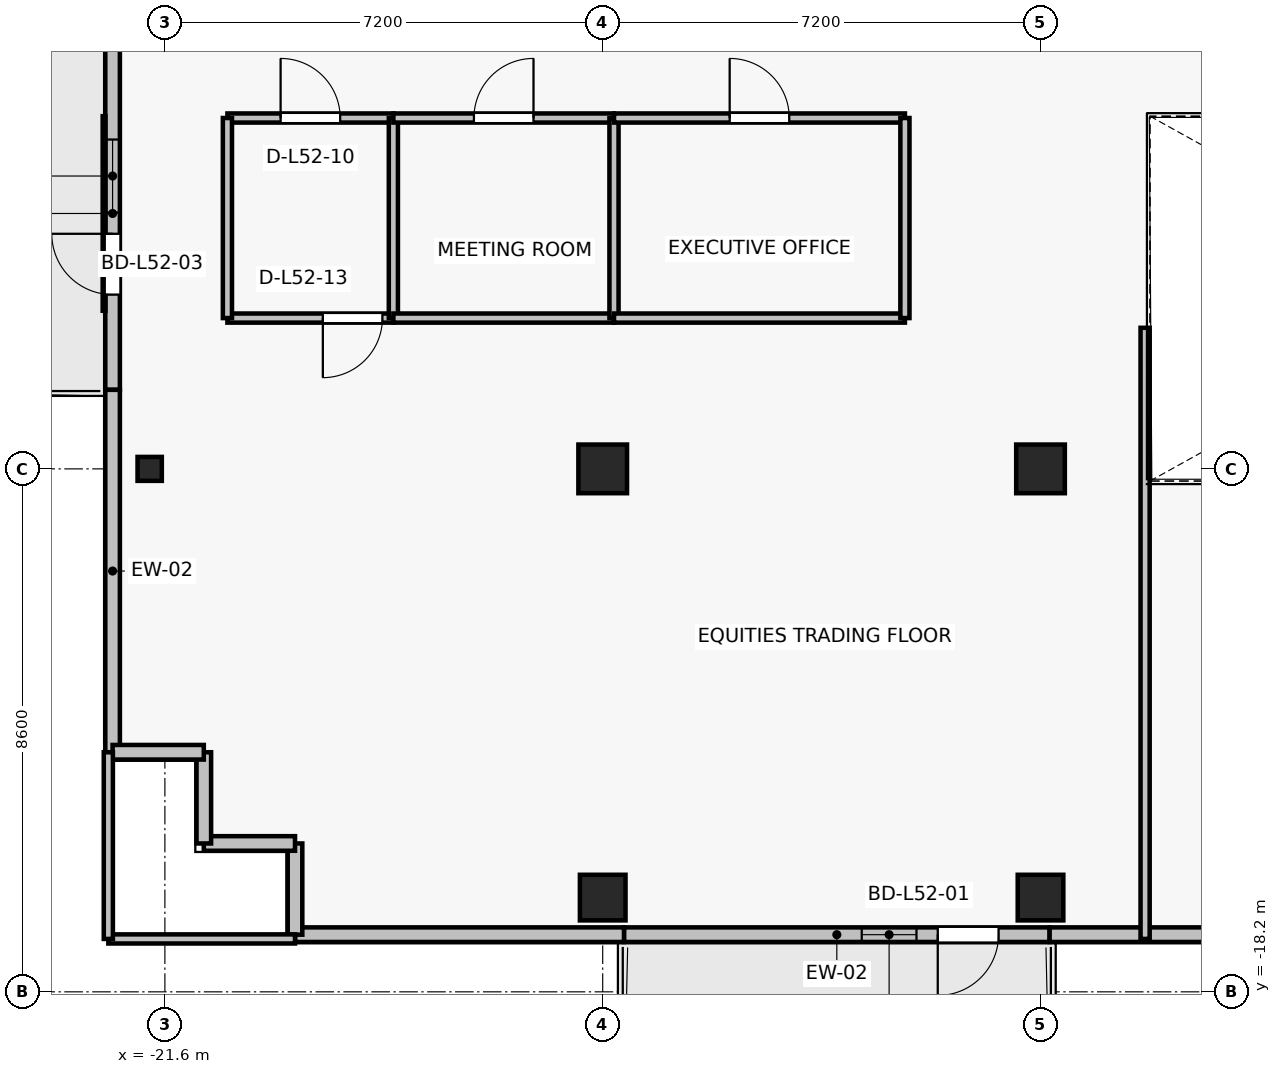
"""IFC4 building model, lengths in metres.
Left out: names, types, materials, properties, quantities, classifications, styles, units other than length and angle.
Written with IfcOpenShell. Run it as: python <this file> out.ifc"""

import sys

from ifc_helpers import new_model, si_unit, direction, frame, frame_2d, origin, origin_2d, place, context, subcontext, project, spatial, rectangle, i_section, extrude, source, transform, mapped, element, fill, save


model = new_model("IFC4")
c1 = context("Model", 3, precision=1e-05, world=origin(), true_north=direction((0.0, 1.0)))
c2 = subcontext(c1, "Body", "Model", "MODEL_VIEW")
j1 = project(units=[si_unit("LENGTHUNIT", "METRE"), si_unit("PLANEANGLEUNIT", "RADIAN")], contexts=[c1])
p1 = place(None, origin())
s1 = spatial("IfcSite", under=j1, at=p1, CompositionType="ELEMENT")
p2 = place(p1, origin())
s2 = spatial("IfcBuilding", under=s1, at=p2, CompositionType="ELEMENT")
p3 = place(p2, frame((0.0, 0.0, 185.8)))
s3 = spatial("IfcBuildingStorey", under=s2, at=p3, CompositionType="ELEMENT", Elevation=185.8)
for number, where, z_axis, x_axis in (
    (1, (-14.4, -9.6, 0.0), (0.0, 0.0, 1.0), (1.0, 0.0, 0.0)),
    (2, (-7.2, -9.6, 0.0), (0.0, 0.0, 1.0), (1.0, 0.0, 0.0)),
):
    element("IfcColumn", number, at=place(p3, frame(where, z_axis=z_axis, x_axis=x_axis)), inside=s3, PredefinedType="COLUMN", context=c2, shape_type="SweptSolid", body=[
        extrude(rectangle(XDim=0.8, YDim=0.8, at=origin_2d()), origin(), (0.0, 0.0, 1.0), 3.3),
    ])
for number, where, z_axis, x_axis in (
    (3, (-14.4, -16.65, 0.0), (0.0, 0.0, 1.0), (1.0, 0.0, 0.0)),
    (4, (-7.2, -16.65, 0.0), (0.0, 0.0, 1.0), (1.0, 0.0, 0.0)),
):
    element("IfcColumn", number, at=place(p3, frame(where, z_axis=z_axis, x_axis=x_axis)), inside=s3, PredefinedType="COLUMN", context=c2, shape_type="SweptSolid", body=[
        extrude(rectangle(XDim=0.75, YDim=0.75, at=origin_2d()), origin(), (0.0, 0.0, 1.0), 3.3),
    ])
p4 = place(p3, frame((-21.85, -9.6, 0.0), z_axis=(0.0, 0.0, 1.0), x_axis=(1.0, 0.0, 0.0)))
e5 = element("IfcColumn", 5, at=p4, inside=s3, PredefinedType="COLUMN", context=c2, shape_type="SweptSolid", body=[
    extrude(i_section(OverallWidth=0.399, OverallDepth=0.394, WebThickness=0.023, FlangeThickness=0.037, FilletRadius=0.015, at=origin_2d()), origin(), (0.0, 0.0, 1.0), 3.3),
])
p5 = place(p3, frame((-7.05, -17.26, 0.0), z_axis=(0.0, 0.0, 1.0), x_axis=(-1.0, 0.0, 0.0)))
e6 = element("IfcWall", 6, at=p5, inside=s3, PredefinedType="SOLIDWALL", context=c2, shape_type="SweptSolid", body=[
    extrude(rectangle(XDim=7.0, YDim=0.24, at=frame_2d((3.5, 0.0))), origin(), (0.0, 0.0, 1.0), 2.665),
])
p6 = place(p5, frame((0.84, 0.0, 0.0)))
e7 = element("IfcOpeningElement", 7, at=p6, cuts=e6, PredefinedType="OPENING", context=c2, shape_type="SweptSolid", body=[
    extrude(rectangle(XDim=1.0, YDim=2.2, at=frame_2d((0.5, 1.1))), frame((0.0, 0.13, 0.0), z_axis=(0.0, -1.0, 0.0), x_axis=(1.0, 0.0, 0.0)), (0.0, 0.0, 1.0), 0.26),
])
p7 = place(p5, frame((2.19, 0.0, 0.85)))
e8 = element("IfcOpeningElement", 8, at=p7, cuts=e6, PredefinedType="OPENING", context=c2, shape_type="SweptSolid", body=[
    extrude(rectangle(XDim=0.9, YDim=1.35, at=frame_2d((0.45, 0.675))), frame((0.0, 0.13, 0.0), z_axis=(0.0, -1.0, 0.0), x_axis=(1.0, 0.0, 0.0)), (0.0, 0.0, 1.0), 0.26),
])
p8 = place(p3, frame((-22.46, -8.3, 0.0), z_axis=(0.0, 0.0, 1.0), x_axis=(0.0, 1.0, 0.0)))
e9 = element("IfcWall", 9, at=p8, inside=s3, PredefinedType="SOLIDWALL", context=c2, shape_type="SweptSolid", body=[
    extrude(rectangle(XDim=5.8, YDim=0.24, at=frame_2d((2.9, 0.0))), origin(), (0.0, 0.0, 1.0), 3.075),
])
p9 = place(p8, frame((1.566, 0.0, 0.0)))
e10 = element("IfcOpeningElement", 10, at=p9, cuts=e9, PredefinedType="OPENING", context=c2, shape_type="SweptSolid", body=[
    extrude(rectangle(XDim=1.0, YDim=2.2, at=frame_2d((0.5, 1.1))), frame((0.0, 0.13, 0.0), z_axis=(0.0, -1.0, 0.0), x_axis=(1.0, 0.0, 0.0)), (0.0, 0.0, 1.0), 0.26),
])
p10 = place(p8, frame((2.916, 0.0, 0.85)))
e11 = element("IfcOpeningElement", 11, at=p10, cuts=e9, PredefinedType="OPENING", context=c2, shape_type="SweptSolid", body=[
    extrude(rectangle(XDim=1.2, YDim=1.5, at=frame_2d((0.6, 0.75))), frame((0.0, 0.13, 0.0), z_axis=(0.0, -1.0, 0.0), x_axis=(1.0, 0.0, 0.0)), (0.0, 0.0, 1.0), 0.26),
])
p11 = place(p3, frame((-22.46, -8.3, 0.0), z_axis=(0.0, 0.0, 1.0), x_axis=(0.0, -1.0, 0.0)))
e12 = element("IfcWall", 12, at=p11, inside=s3, PredefinedType="SOLIDWALL", context=c2, shape_type="SweptSolid", body=[
    extrude(rectangle(XDim=5.96, YDim=0.24, at=frame_2d((2.98, 0.0))), origin(), (0.0, 0.0, 1.0), 3.075),
])
p12 = place(p3, frame((-7.05, -17.26, 0.0), z_axis=(0.0, 0.0, 1.0), x_axis=(1.0, 0.0, 0.0)))
e13 = element("IfcWall", 13, at=p12, inside=s3, PredefinedType="SOLIDWALL", context=c2, shape_type="SweptSolid", body=[
    extrude(rectangle(XDim=3.85, YDim=0.24, at=frame_2d((1.925, 0.0))), origin(), (0.0, 0.0, 1.0), 3.075),
])
p13 = place(p3, frame((-19.46, -17.26, 0.0), z_axis=(0.0, 0.0, 1.0), x_axis=(1.0, 0.0, 0.0)))
e14 = element("IfcWall", 14, at=p13, inside=s3, PredefinedType="SOLIDWALL", context=c2, shape_type="SweptSolid", body=[
    extrude(rectangle(XDim=5.41, YDim=0.24, at=frame_2d((2.705, 0.0))), origin(), (0.0, 0.0, 1.0), 3.075),
])
for number, where, z_axis, x_axis in (
    (15, (-19.46, -15.76, 0.0), (0.0, 0.0, 1.0), (0.0, -1.0, 0.0)),
    (16, (-20.96, -15.76, 0.0), (0.0, 0.0, 1.0), (1.0, 0.0, 0.0)),
    (17, (-20.96, -14.26, 0.0), (0.0, 0.0, 1.0), (0.0, -1.0, 0.0)),
    (18, (-22.46, -14.26, 0.0), (0.0, 0.0, 1.0), (1.0, 0.0, 0.0)),
):
    element("IfcWall", number, at=place(p3, frame(where, z_axis=z_axis, x_axis=x_axis)), inside=s3, PredefinedType="SOLIDWALL", context=c2, shape_type="SweptSolid", body=[
        extrude(rectangle(XDim=1.5, YDim=0.24, at=frame_2d((0.75, 0.0))), origin(), (0.0, 0.0, 1.0), 3.075),
    ])
p14 = place(p3, frame((-17.843, -7.12, 0.0), z_axis=(0.0, 0.0, 1.0), x_axis=(-1.0, 0.0, 0.0)))
e19 = element("IfcWall", 19, at=p14, inside=s3, PredefinedType="PARTITIONING", context=c2, shape_type="SweptSolid", body=[
    extrude(rectangle(XDim=2.729, YDim=0.15, at=frame_2d((1.365, 0.0))), origin(), (0.0, 0.0, 1.0), 3.075),
])
p15 = place(p14, frame((0.18, 0.0, 0.0)))
e20 = element("IfcOpeningElement", 20, at=p15, cuts=e19, PredefinedType="OPENING", context=c2, shape_type="SweptSolid", body=[
    extrude(rectangle(XDim=0.98, YDim=2.15, at=frame_2d((0.49, 1.075))), frame((0.0, 0.085, 0.0), z_axis=(0.0, -1.0, 0.0), x_axis=(1.0, 0.0, 0.0)), (0.0, 0.0, 1.0), 0.17),
])
p16 = place(p3, frame((-20.572, -3.83, 0.0), z_axis=(0.0, 0.0, 1.0), x_axis=(1.0, 0.0, 0.0)))
e21 = element("IfcWall", 21, at=p16, inside=s3, PredefinedType="PARTITIONING", context=c2, shape_type="SweptSolid", body=[
    extrude(rectangle(XDim=2.729, YDim=0.15, at=frame_2d((1.365, 0.0))), origin(), (0.0, 0.0, 1.0), 3.075),
])
p17 = place(p16, frame((0.875, 0.0, 0.0)))
e22 = element("IfcOpeningElement", 22, at=p17, cuts=e21, PredefinedType="OPENING", context=c2, shape_type="SweptSolid", body=[
    extrude(rectangle(XDim=0.98, YDim=2.15, at=frame_2d((0.49, 1.075))), frame((0.0, 0.085, 0.0), z_axis=(0.0, -1.0, 0.0), x_axis=(1.0, 0.0, 0.0)), (0.0, 0.0, 1.0), 0.17),
])
for number, where, z_axis, x_axis in (
    (23, (-20.572, -7.12, 0.0), (0.0, 0.0, 1.0), (0.0, 1.0, 0.0)),
    (24, (-17.843, -3.83, 0.0), (0.0, 0.0, 1.0), (0.0, -1.0, 0.0)),
):
    element("IfcWall", number, at=place(p3, frame(where, z_axis=z_axis, x_axis=x_axis)), inside=s3, PredefinedType="PARTITIONING", context=c2, shape_type="SweptSolid", body=[
        extrude(rectangle(XDim=3.29, YDim=0.15, at=frame_2d((1.645, 0.0))), origin(), (0.0, 0.0, 1.0), 2.665),
    ])
p18 = place(p3, frame((-14.214, -7.12, 0.0), z_axis=(0.0, 0.0, 1.0), x_axis=(-1.0, 0.0, 0.0)))
e25 = element("IfcWall", 25, at=p18, inside=s3, PredefinedType="PARTITIONING", context=c2, shape_type="SweptSolid", body=[
    extrude(rectangle(XDim=3.628, YDim=0.15, at=frame_2d((1.814, 0.0))), origin(), (0.0, 0.0, 1.0), 2.565),
])
p19 = place(p3, frame((-17.843, -3.83, 0.0), z_axis=(0.0, 0.0, 1.0), x_axis=(1.0, 0.0, 0.0)))
e26 = element("IfcWall", 26, at=p19, inside=s3, PredefinedType="PARTITIONING", context=c2, shape_type="SweptSolid", body=[
    extrude(rectangle(XDim=3.628, YDim=0.15, at=frame_2d((1.814, 0.0))), origin(), (0.0, 0.0, 1.0), 2.565),
])
p20 = place(p19, frame((1.324, 0.0, 0.0)))
e27 = element("IfcOpeningElement", 27, at=p20, cuts=e26, PredefinedType="OPENING", context=c2, shape_type="SweptSolid", body=[
    extrude(rectangle(XDim=0.98, YDim=2.15, at=frame_2d((0.49, 1.075))), frame((0.0, 0.085, 0.0), z_axis=(0.0, -1.0, 0.0), x_axis=(1.0, 0.0, 0.0)), (0.0, 0.0, 1.0), 0.17),
])
p21 = place(p3, frame((-14.214, -3.83, 0.0), z_axis=(0.0, 0.0, 1.0), x_axis=(0.0, -1.0, 0.0)))
e28 = element("IfcWall", 28, at=p21, inside=s3, PredefinedType="PARTITIONING", context=c2, shape_type="SweptSolid", body=[
    extrude(rectangle(XDim=3.29, YDim=0.15, at=frame_2d((1.645, 0.0))), origin(), (0.0, 0.0, 1.0), 2.565),
])
p22 = place(p3, frame((-9.43, -7.12, 0.0), z_axis=(0.0, 0.0, 1.0), x_axis=(-1.0, 0.0, 0.0)))
e29 = element("IfcWall", 29, at=p22, inside=s3, PredefinedType="PARTITIONING", context=c2, shape_type="SweptSolid", body=[
    extrude(rectangle(XDim=4.784, YDim=0.15, at=frame_2d((2.392, 0.0))), origin(), (0.0, 0.0, 1.0), 2.565),
])
p23 = place(p3, frame((-14.214, -3.83, 0.0), z_axis=(0.0, 0.0, 1.0), x_axis=(1.0, 0.0, 0.0)))
e30 = element("IfcWall", 30, at=p23, inside=s3, PredefinedType="PARTITIONING", context=c2, shape_type="SweptSolid", body=[
    extrude(rectangle(XDim=4.784, YDim=0.15, at=frame_2d((2.392, 0.0))), origin(), (0.0, 0.0, 1.0), 2.565),
])
p24 = place(p23, frame((1.902, 0.0, 0.0)))
e31 = element("IfcOpeningElement", 31, at=p24, cuts=e30, PredefinedType="OPENING", context=c2, shape_type="SweptSolid", body=[
    extrude(rectangle(XDim=0.98, YDim=2.15, at=frame_2d((0.49, 1.075))), frame((0.0, 0.085, 0.0), z_axis=(0.0, -1.0, 0.0), x_axis=(1.0, 0.0, 0.0)), (0.0, 0.0, 1.0), 0.17),
])
p25 = place(p3, frame((-9.43, -3.83, 0.0), z_axis=(0.0, 0.0, 1.0), x_axis=(0.0, -1.0, 0.0)))
e32 = element("IfcWall", 32, at=p25, inside=s3, PredefinedType="PARTITIONING", context=c2, shape_type="SweptSolid", body=[
    extrude(rectangle(XDim=3.29, YDim=0.15, at=frame_2d((1.645, 0.0))), origin(), (0.0, 0.0, 1.0), 2.665),
])
p26 = place(p3, frame((-19.46, -17.33, 0.0), z_axis=(0.0, 0.0, 1.0), x_axis=(-1.0, 0.0, 0.0)))
e33 = element("IfcWall", 33, at=p26, inside=s3, PredefinedType="PARTITIONING", context=c2, shape_type="SweptSolid", body=[
    extrude(rectangle(XDim=3.07, YDim=0.15, at=frame_2d((1.535, 0.0))), origin(), (0.0, 0.0, 1.0), 2.665),
])
p27 = place(p3, frame((-22.53, -17.33, 0.0), z_axis=(0.0, 0.0, 1.0), x_axis=(0.0, 1.0, 0.0)))
e34 = element("IfcWall", 34, at=p27, inside=s3, PredefinedType="PARTITIONING", context=c2, shape_type="SweptSolid", body=[
    extrude(rectangle(XDim=3.07, YDim=0.15, at=frame_2d((1.535, 0.0))), origin(), (0.0, 0.0, 1.0), 3.075),
])
p28 = place(p3, frame((-5.48, -7.28, 0.0), z_axis=(0.0, 0.0, 1.0), x_axis=(0.0, -1.0, 0.0)))
e35 = element("IfcWall", 35, at=p28, inside=s3, PredefinedType="PARTITIONING", context=c2, shape_type="SweptSolid", body=[
    extrude(rectangle(XDim=10.05, YDim=0.15, at=frame_2d((5.025, 0.0))), origin(), (0.0, 0.0, 1.0), 2.565),
])
m1 = source(origin(), c2, "Body", "SweptSolid", [
    extrude(rectangle(XDim=1.0, YDim=2.2, at=frame_2d((0.5, 1.1))), frame((0.0, 0.025, 0.0), z_axis=(0.0, -1.0, 0.0), x_axis=(1.0, 0.0, 0.0)), (0.0, 0.0, 1.0), 0.05),
])
p29 = place(p6, origin())
e36 = element("IfcDoor", 36, at=p29, inside=s3, OperationType="SINGLE_SWING_RIGHT", PredefinedType="DOOR", context=c2, shape_type="MappedRepresentation", body=[
    mapped(m1, transform((0.0, 0.0, 0.0), x_axis=(1.0, 0.0, 0.0), y_axis=(0.0, 1.0, 0.0), z_axis=(0.0, 0.0, 1.0), scale=1.0)),
])
fill(e7, e36)
m2 = source(origin(), c2, "Body", "SweptSolid", [
    extrude(rectangle(XDim=0.9, YDim=1.35, at=frame_2d((0.45, 0.675))), frame((0.0, 0.03, 0.0), z_axis=(0.0, -1.0, 0.0), x_axis=(1.0, 0.0, 0.0)), (0.0, 0.0, 1.0), 0.06),
])
p30 = place(p7, origin())
e37 = element("IfcWindow", 37, at=p30, inside=s3, PartitioningType="SINGLE_PANEL", PredefinedType="WINDOW", context=c2, shape_type="MappedRepresentation", body=[
    mapped(m2, transform((0.0, 0.0, 0.0), x_axis=(1.0, 0.0, 0.0), y_axis=(0.0, 1.0, 0.0), z_axis=(0.0, 0.0, 1.0), scale=1.0)),
])
fill(e8, e37)
p31 = place(p9, origin())
e38 = element("IfcDoor", 38, at=p31, inside=s3, OperationType="SINGLE_SWING_RIGHT", PredefinedType="DOOR", context=c2, shape_type="MappedRepresentation", body=[
    mapped(m1, transform((0.0, 0.0, 0.0), x_axis=(1.0, 0.0, 0.0), y_axis=(0.0, 1.0, 0.0), z_axis=(0.0, 0.0, 1.0), scale=1.0)),
])
fill(e10, e38)
m3 = source(origin(), c2, "Body", "SweptSolid", [
    extrude(rectangle(XDim=1.2, YDim=1.5, at=frame_2d((0.6, 0.75))), frame((0.0, 0.03, 0.0), z_axis=(0.0, -1.0, 0.0), x_axis=(1.0, 0.0, 0.0)), (0.0, 0.0, 1.0), 0.06),
])
p32 = place(p10, origin())
e39 = element("IfcWindow", 39, at=p32, inside=s3, PartitioningType="SINGLE_PANEL", PredefinedType="WINDOW", context=c2, shape_type="MappedRepresentation", body=[
    mapped(m3, transform((0.0, 0.0, 0.0), x_axis=(1.0, 0.0, 0.0), y_axis=(0.0, 1.0, 0.0), z_axis=(0.0, 0.0, 1.0), scale=1.0)),
])
fill(e11, e39)
m4 = source(origin(), c2, "Body", "SweptSolid", [
    extrude(rectangle(XDim=0.98, YDim=2.15, at=frame_2d((0.49, 1.075))), frame((0.0, 0.025, 0.0), z_axis=(0.0, -1.0, 0.0), x_axis=(1.0, 0.0, 0.0)), (0.0, 0.0, 1.0), 0.05),
])
p33 = place(p17, origin())
e40 = element("IfcDoor", 40, at=p33, inside=s3, OperationType="SINGLE_SWING_LEFT", PredefinedType="DOOR", context=c2, shape_type="MappedRepresentation", body=[
    mapped(m4, transform((0.0, 0.0, 0.0), x_axis=(1.0, 0.0, 0.0), y_axis=(0.0, 1.0, 0.0), z_axis=(0.0, 0.0, 1.0), scale=1.0)),
])
fill(e22, e40)
p34 = place(p20, origin())
e41 = element("IfcDoor", 41, at=p34, inside=s3, OperationType="SINGLE_SWING_RIGHT", PredefinedType="DOOR", context=c2, shape_type="MappedRepresentation", body=[
    mapped(m4, transform((0.0, 0.0, 0.0), x_axis=(1.0, 0.0, 0.0), y_axis=(0.0, 1.0, 0.0), z_axis=(0.0, 0.0, 1.0), scale=1.0)),
])
fill(e27, e41)
p35 = place(p24, origin())
e42 = element("IfcDoor", 42, at=p35, inside=s3, OperationType="SINGLE_SWING_LEFT", PredefinedType="DOOR", context=c2, shape_type="MappedRepresentation", body=[
    mapped(m4, transform((0.0, 0.0, 0.0), x_axis=(1.0, 0.0, 0.0), y_axis=(0.0, 1.0, 0.0), z_axis=(0.0, 0.0, 1.0), scale=1.0)),
])
fill(e31, e42)
p36 = place(p15, origin())
e43 = element("IfcDoor", 43, at=p36, inside=s3, OperationType="SINGLE_SWING_RIGHT", PredefinedType="DOOR", context=c2, shape_type="MappedRepresentation", body=[
    mapped(m4, transform((0.0, 0.0, 0.0), x_axis=(1.0, 0.0, 0.0), y_axis=(0.0, 1.0, 0.0), z_axis=(0.0, 0.0, 1.0), scale=1.0)),
])
fill(e20, e43)
save(model, sys.argv[1])
